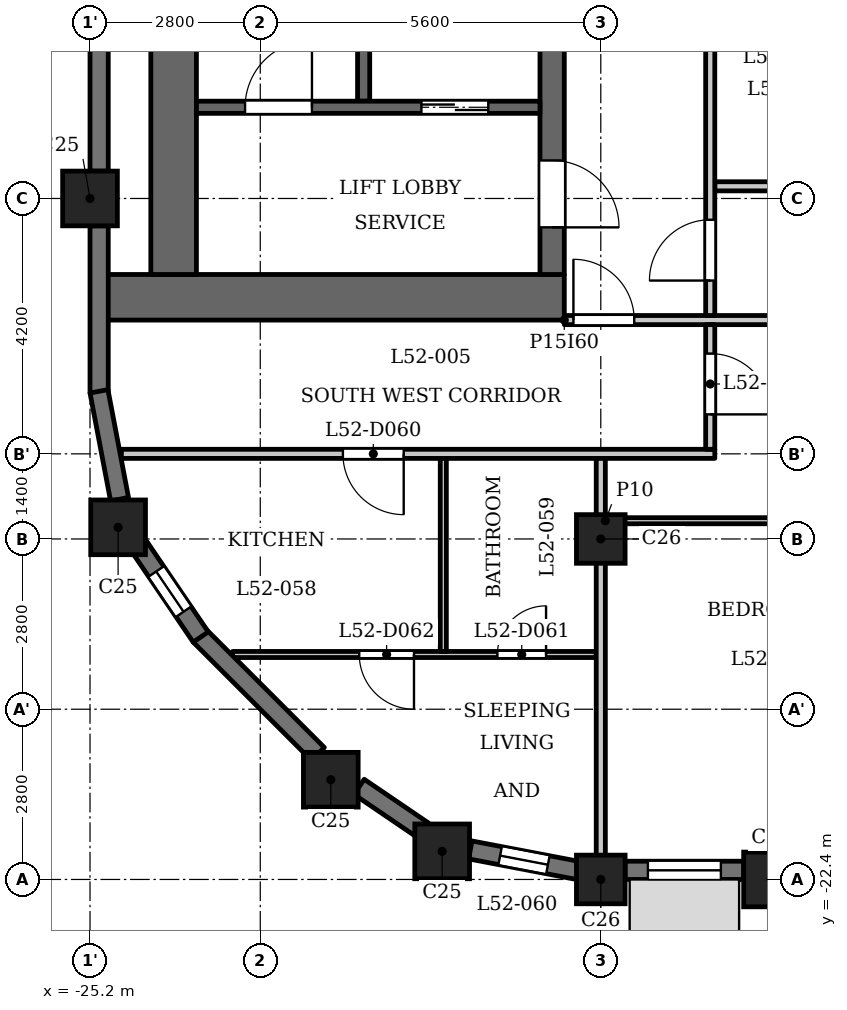
"""IFC4 building model, lengths in metres.
Left out: names, types, materials, properties, quantities, classifications, styles, units other than length and angle.
Written with IfcOpenShell. Run it as: python <this file> out.ifc"""

import sys

from ifc_helpers import new_model, si_unit, direction, frame, frame_2d, origin, origin_2d, place, context, subcontext, project, spatial, rectangle, extrude, element, fill, save


model = new_model("IFC4")
c1 = context("Model", 3, precision=1e-05, world=origin(), true_north=direction((0.0, 1.0)))
c2 = subcontext(c1, "Body", "Model", "MODEL_VIEW")
j1 = project(units=[si_unit("LENGTHUNIT", "METRE"), si_unit("PLANEANGLEUNIT", "RADIAN")], contexts=[c1])
p1 = place(None, origin())
s1 = spatial("IfcSite", under=j1, at=p1, CompositionType="ELEMENT")
p2 = place(p1, origin())
s2 = spatial("IfcBuilding", under=s1, at=p2, CompositionType="ELEMENT")
p3 = place(p2, frame((0.0, 0.0, 202.9)))
s3 = spatial("IfcBuildingStorey", under=s2, at=p3, CompositionType="ELEMENT", Elevation=202.9)
for number, where, z_axis, x_axis in (
    (1, (-19.409, -21.938, 0.0), (0.0, 0.0, 1.0), (1.0, 0.0, 0.0)),
    (2, (-14.0, -22.4, 0.0), (0.0, 0.0, 1.0), (1.0, 0.0, 0.0)),
    (3, (-25.2, -11.2, 0.0), (0.0, 0.0, 1.0), (1.0, 0.0, 0.0)),
    (4, (-24.738, -16.609, 0.0), (0.0, 0.0, 1.0), (1.0, 0.0, 0.0)),
    (5, (-21.24, -20.76, 0.0), (0.0, 0.0, 1.0), (1.0, 0.0, 0.0)),
):
    element("IfcColumn", number, at=place(p3, frame(where, z_axis=z_axis, x_axis=x_axis)), inside=s3, PredefinedType="COLUMN", context=c2, shape_type="SweptSolid", body=[
        extrude(rectangle(XDim=0.9, YDim=0.9, at=origin_2d()), origin(), (0.0, 0.0, 1.0), 3.5),
    ])
for number, where, z_axis, x_axis in (
    (6, (-16.8, -22.4, 0.0), (0.0, 0.0, 1.0), (1.0, 0.0, 0.0)),
    (7, (-16.8, -16.8, 0.0), (0.0, 0.0, 1.0), (1.0, 0.0, 0.0)),
):
    element("IfcColumn", number, at=place(p3, frame(where, z_axis=z_axis, x_axis=x_axis)), inside=s3, PredefinedType="COLUMN", context=c2, shape_type="SweptSolid", body=[
        extrude(rectangle(XDim=0.8, YDim=0.8, at=origin_2d()), origin(), (0.0, 0.0, 1.0), 3.5),
    ])
p4 = place(p3, frame((-23.397, -18.391, 0.0), z_axis=(0.0, 0.0, 1.0), x_axis=(0.707106781187, -0.707106781187, 0.0)))
e8 = element("IfcWall", 8, at=p4, inside=s3, PredefinedType="SOLIDWALL", context=c2, shape_type="SweptSolid", body=[
    extrude(rectangle(XDim=2.75, YDim=0.3, at=frame_2d((1.375, 0.0))), origin(), (0.0, 0.0, 1.0), 2.5),
])
p5 = place(p3, frame((-20.775, -20.876, 0.0), z_axis=(0.0, 0.0, 1.0), x_axis=(0.827075824828, -0.562090366388, 0.0)))
e9 = element("IfcWall", 9, at=p5, inside=s3, PredefinedType="SOLIDWALL", context=c2, shape_type="SweptSolid", body=[
    extrude(rectangle(XDim=1.277, YDim=0.3, at=frame_2d((0.638, 0.0))), origin(), (0.0, 0.0, 1.0), 2.5),
])
p6 = place(p3, frame((-18.946, -21.914, 0.0), z_axis=(0.0, 0.0, 1.0), x_axis=(0.98230529033, -0.187286722942, 0.0)))
e10 = element("IfcWall", 10, at=p6, inside=s3, PredefinedType="SOLIDWALL", context=c2, shape_type="SweptSolid", body=[
    extrude(rectangle(XDim=1.799, YDim=0.3, at=frame_2d((0.899, 0.0))), origin(), (0.0, 0.0, 1.0), 2.5),
])
p7 = place(p6, frame((0.5, 0.0, 0.6)))
e11 = element("IfcOpeningElement", 11, at=p7, cuts=e10, PredefinedType="OPENING", context=c2, shape_type="SweptSolid", body=[
    extrude(rectangle(XDim=0.8, YDim=1.55, at=frame_2d((0.4, 0.775))), frame((0.0, 0.16, 0.0), z_axis=(0.0, -1.0, 0.0), x_axis=(1.0, 0.0, 0.0)), (0.0, 0.0, 1.0), 0.32),
])
p8 = place(p3, frame((-16.4, -22.25, 0.0), z_axis=(0.0, 0.0, 1.0), x_axis=(1.0, 0.0, 0.0)))
e12 = element("IfcWall", 12, at=p8, inside=s3, PredefinedType="SOLIDWALL", context=c2, shape_type="SweptSolid", body=[
    extrude(rectangle(XDim=1.95, YDim=0.3, at=frame_2d((0.975, 0.0))), origin(), (0.0, 0.0, 1.0), 2.5),
])
p9 = place(p8, frame((0.375, 0.0, 0.6)))
e13 = element("IfcOpeningElement", 13, at=p9, cuts=e12, PredefinedType="OPENING", context=c2, shape_type="SweptSolid", body=[
    extrude(rectangle(XDim=1.2, YDim=1.55, at=frame_2d((0.6, 0.775))), frame((0.0, 0.16, 0.0), z_axis=(0.0, -1.0, 0.0), x_axis=(1.0, 0.0, 0.0)), (0.0, 0.0, 1.0), 0.32),
])
p10 = place(p3, frame((-25.05, -6.05, 0.0), z_axis=(0.0, 0.0, 1.0), x_axis=(0.0, -1.0, 0.0)))
e14 = element("IfcWall", 14, at=p10, inside=s3, PredefinedType="SOLIDWALL", context=c2, shape_type="SweptSolid", body=[
    extrude(rectangle(XDim=4.7, YDim=0.3, at=frame_2d((2.35, 0.0))), origin(), (0.0, 0.0, 1.0), 2.5),
])
p11 = place(p3, frame((-25.05, -11.65, 0.0), z_axis=(0.0, 0.0, 1.0), x_axis=(0.0, -1.0, 0.0)))
e15 = element("IfcWall", 15, at=p11, inside=s3, PredefinedType="SOLIDWALL", context=c2, shape_type="SweptSolid", body=[
    extrude(rectangle(XDim=2.75, YDim=0.3, at=frame_2d((1.375, 0.0))), origin(), (0.0, 0.0, 1.0), 2.5),
])
p12 = place(p3, frame((-25.053, -14.372, 0.0), z_axis=(0.0, 0.0, 1.0), x_axis=(0.187348135549, -0.982293579388, 0.0)))
e16 = element("IfcWall", 16, at=p12, inside=s3, PredefinedType="SOLIDWALL", context=c2, shape_type="SweptSolid", body=[
    extrude(rectangle(XDim=1.806, YDim=0.3, at=frame_2d((0.903, 0.0))), origin(), (0.0, 0.0, 1.0), 2.5),
])
p13 = place(p3, frame((-24.394, -16.919, 0.0), z_axis=(0.0, 0.0, 1.0), x_axis=(0.562040093569, -0.827109988588, 0.0)))
e17 = element("IfcWall", 17, at=p13, inside=s3, PredefinedType="SOLIDWALL", context=c2, shape_type="SweptSolid", body=[
    extrude(rectangle(XDim=1.806, YDim=0.3, at=frame_2d((0.903, 0.0))), origin(), (0.0, 0.0, 1.0), 2.5),
])
p14 = place(p13, frame((0.503, 0.0, 0.6)))
e18 = element("IfcOpeningElement", 18, at=p14, cuts=e17, PredefinedType="OPENING", context=c2, shape_type="SweptSolid", body=[
    extrude(rectangle(XDim=0.8, YDim=1.55, at=frame_2d((0.4, 0.775))), frame((0.0, 0.16, 0.0), z_axis=(0.0, -1.0, 0.0), x_axis=(1.0, 0.0, 0.0)), (0.0, 0.0, 1.0), 0.32),
])
p15 = place(p3, frame((-20.7, -9.6, 0.0), z_axis=(0.0, 0.0, 1.0), x_axis=(0.0, 1.0, 0.0)))
e19 = element("IfcWall", 19, at=p15, inside=s3, PredefinedType="SHEAR", context=c2, shape_type="SweptSolid", body=[
    extrude(rectangle(XDim=9.75, YDim=0.2, at=frame_2d((4.875, 0.0))), origin(), (0.0, 0.0, 1.0), 3.2),
])
p16 = place(p3, frame((-17.4, -12.825, 0.0), z_axis=(0.0, 0.0, 1.0), x_axis=(-1.0, 0.0, 0.0)))
e20 = element("IfcWall", 20, at=p16, inside=s3, PredefinedType="SHEAR", context=c2, shape_type="SweptSolid", body=[
    extrude(rectangle(XDim=7.6, YDim=0.75, at=frame_2d((3.8, 0.0))), origin(), (0.0, 0.0, 1.0), 3.2),
])
p17 = place(p3, frame((-17.6, -12.45, 0.0), z_axis=(0.0, 0.0, 1.0), x_axis=(0.0, 1.0, 0.0)))
e21 = element("IfcWall", 21, at=p17, inside=s3, PredefinedType="SHEAR", context=c2, shape_type="SweptSolid", body=[
    extrude(rectangle(XDim=24.9, YDim=0.4, at=frame_2d((12.45, 0.0))), origin(), (0.0, 0.0, 1.0), 3.2),
])
p18 = place(p17, frame((8.65, 0.0, 0.0)))
e22 = element("IfcOpeningElement", 22, at=p18, cuts=e21, PredefinedType="OPENING", context=c2, shape_type="SweptSolid", body=[
    extrude(rectangle(XDim=0.9, YDim=2.1, at=frame_2d((0.45, 1.05))), frame((0.0, 0.21, 0.0), z_axis=(0.0, -1.0, 0.0), x_axis=(1.0, 0.0, 0.0)), (0.0, 0.0, 1.0), 0.42),
])
p19 = place(p17, frame((15.6, 0.0, 0.0)))
e23 = element("IfcOpeningElement", 23, at=p19, cuts=e21, PredefinedType="OPENING", context=c2, shape_type="SweptSolid", body=[
    extrude(rectangle(XDim=1.1, YDim=2.1, at=frame_2d((0.55, 1.05))), frame((0.0, 0.21, 0.0), z_axis=(0.0, -1.0, 0.0), x_axis=(1.0, 0.0, 0.0)), (0.0, 0.0, 1.0), 0.42),
])
p20 = place(p17, frame((18.0, 0.0, 0.0)))
e24 = element("IfcOpeningElement", 24, at=p20, cuts=e21, PredefinedType="OPENING", context=c2, shape_type="SweptSolid", body=[
    extrude(rectangle(XDim=1.1, YDim=2.1, at=frame_2d((0.55, 1.05))), frame((0.0, 0.21, 0.0), z_axis=(0.0, -1.0, 0.0), x_axis=(1.0, 0.0, 0.0)), (0.0, 0.0, 1.0), 0.42),
])
p21 = place(p17, frame((23.025, 0.0, 0.0)))
e25 = element("IfcOpeningElement", 25, at=p21, cuts=e21, PredefinedType="OPENING", context=c2, shape_type="SweptSolid", body=[
    extrude(rectangle(XDim=1.1, YDim=2.1, at=frame_2d((0.55, 1.05))), frame((0.0, 0.21, 0.0), z_axis=(0.0, -1.0, 0.0), x_axis=(1.0, 0.0, 0.0)), (0.0, 0.0, 1.0), 0.42),
])
p22 = place(p17, frame((0.775, 0.0, 0.0)))
e26 = element("IfcOpeningElement", 26, at=p22, cuts=e21, PredefinedType="OPENING", context=c2, shape_type="SweptSolid", body=[
    extrude(rectangle(XDim=1.1, YDim=2.1, at=frame_2d((0.55, 1.05))), frame((0.0, 0.21, 0.0), z_axis=(0.0, -1.0, 0.0), x_axis=(1.0, 0.0, 0.0)), (0.0, 0.0, 1.0), 0.42),
])
p23 = place(p17, frame((12.925, 0.0, 0.0)))
e27 = element("IfcOpeningElement", 27, at=p23, cuts=e21, PredefinedType="OPENING", context=c2, shape_type="SweptSolid", body=[
    extrude(rectangle(XDim=1.8, YDim=2.1, at=frame_2d((0.9, 1.05))), frame((0.0, 0.21, 0.0), z_axis=(0.0, -1.0, 0.0), x_axis=(1.0, 0.0, 0.0)), (0.0, 0.0, 1.0), 0.42),
])
p24 = place(p3, frame((-23.825, -12.45, 0.0), z_axis=(0.0, 0.0, 1.0), x_axis=(0.0, 1.0, 0.0)))
e28 = element("IfcWall", 28, at=p24, inside=s3, PredefinedType="SHEAR", context=c2, shape_type="SweptSolid", body=[
    extrude(rectangle(XDim=24.9, YDim=0.75, at=frame_2d((12.45, 0.0))), origin(), (0.0, 0.0, 1.0), 3.2),
])
p25 = place(p3, frame((-17.8, -9.7, 0.0), z_axis=(0.0, 0.0, 1.0), x_axis=(-1.0, 0.0, 0.0)))
e29 = element("IfcWall", 29, at=p25, inside=s3, PredefinedType="SHEAR", context=c2, shape_type="SweptSolid", body=[
    extrude(rectangle(XDim=5.65, YDim=0.2, at=frame_2d((2.825, 0.0))), origin(), (0.0, 0.0, 1.0), 3.2),
])
p26 = place(p25, frame((0.85, 0.0, 0.0)))
e30 = element("IfcOpeningElement", 30, at=p26, cuts=e29, PredefinedType="OPENING", context=c2, shape_type="SweptSolid", body=[
    extrude(rectangle(XDim=1.1, YDim=2.1, at=frame_2d((0.55, 1.05))), frame((0.0, 0.11, 0.0), z_axis=(0.0, -1.0, 0.0), x_axis=(1.0, 0.0, 0.0)), (0.0, 0.0, 1.0), 0.22),
])
p27 = place(p25, frame((3.75, 0.0, 0.0)))
e31 = element("IfcOpeningElement", 31, at=p27, cuts=e29, PredefinedType="OPENING", context=c2, shape_type="SweptSolid", body=[
    extrude(rectangle(XDim=1.1, YDim=2.1, at=frame_2d((0.55, 1.05))), frame((0.0, 0.11, 0.0), z_axis=(0.0, -1.0, 0.0), x_axis=(1.0, 0.0, 0.0)), (0.0, 0.0, 1.0), 0.22),
])
p28 = place(p3, frame((-22.856, -18.7, 0.0), z_axis=(0.0, 0.0, 1.0), x_axis=(1.0, 0.0, 0.0)))
e32 = element("IfcWall", 32, at=p28, inside=s3, PredefinedType="PARTITIONING", context=c2, shape_type="SweptSolid", body=[
    extrude(rectangle(XDim=5.981, YDim=0.1, at=frame_2d((2.99, 0.0))), origin(), (0.0, 0.0, 1.0), 3.2),
])
p29 = place(p28, frame((4.356, 0.0, 0.0)))
e33 = element("IfcOpeningElement", 33, at=p29, cuts=e32, PredefinedType="OPENING", context=c2, shape_type="SweptSolid", body=[
    extrude(rectangle(XDim=0.8, YDim=2.1, at=frame_2d((0.4, 1.05))), frame((0.0, 0.06, 0.0), z_axis=(0.0, -1.0, 0.0), x_axis=(1.0, 0.0, 0.0)), (0.0, 0.0, 1.0), 0.12),
])
p30 = place(p28, frame((2.084, 0.0, 0.0)))
e34 = element("IfcOpeningElement", 34, at=p30, cuts=e32, PredefinedType="OPENING", context=c2, shape_type="SweptSolid", body=[
    extrude(rectangle(XDim=0.9, YDim=2.1, at=frame_2d((0.45, 1.05))), frame((0.0, 0.06, 0.0), z_axis=(0.0, -1.0, 0.0), x_axis=(1.0, 0.0, 0.0)), (0.0, 0.0, 1.0), 0.12),
])
p31 = place(p3, frame((-16.725, -16.5, 0.0), z_axis=(0.0, 0.0, 1.0), x_axis=(1.0, 0.0, 0.0)))
e35 = element("IfcWall", 35, at=p31, inside=s3, PredefinedType="PARTITIONING", context=c2, shape_type="SweptSolid", body=[
    extrude(rectangle(XDim=33.45, YDim=0.1, at=frame_2d((16.725, 0.0))), origin(), (0.0, 0.0, 1.0), 3.2),
])
p32 = place(p31, frame((4.075, 0.0, 0.0)))
e36 = element("IfcOpeningElement", 36, at=p32, cuts=e35, PredefinedType="OPENING", context=c2, shape_type="SweptSolid", body=[
    extrude(rectangle(XDim=0.9, YDim=2.1, at=frame_2d((0.45, 1.05))), frame((0.0, 0.06, 0.0), z_axis=(0.0, -1.0, 0.0), x_axis=(1.0, 0.0, 0.0)), (0.0, 0.0, 1.0), 0.12),
])
p33 = place(p31, frame((6.175, 0.0, 0.0)))
e37 = element("IfcOpeningElement", 37, at=p33, cuts=e35, PredefinedType="OPENING", context=c2, shape_type="SweptSolid", body=[
    extrude(rectangle(XDim=0.9, YDim=2.1, at=frame_2d((0.45, 1.05))), frame((0.0, 0.06, 0.0), z_axis=(0.0, -1.0, 0.0), x_axis=(1.0, 0.0, 0.0)), (0.0, 0.0, 1.0), 0.12),
])
p34 = place(p31, frame((30.575, 0.0, 0.0)))
e38 = element("IfcOpeningElement", 38, at=p34, cuts=e35, PredefinedType="OPENING", context=c2, shape_type="SweptSolid", body=[
    extrude(rectangle(XDim=0.9, YDim=2.1, at=frame_2d((0.45, 1.05))), frame((0.0, 0.06, 0.0), z_axis=(0.0, -1.0, 0.0), x_axis=(1.0, 0.0, 0.0)), (0.0, 0.0, 1.0), 0.12),
])
p35 = place(p31, frame((22.975, 0.0, 0.0)))
e39 = element("IfcOpeningElement", 39, at=p35, cuts=e35, PredefinedType="OPENING", context=c2, shape_type="SweptSolid", body=[
    extrude(rectangle(XDim=0.9, YDim=2.1, at=frame_2d((0.45, 1.05))), frame((0.0, 0.06, 0.0), z_axis=(0.0, -1.0, 0.0), x_axis=(1.0, 0.0, 0.0)), (0.0, 0.0, 1.0), 0.12),
])
p36 = place(p3, frame((-24.684, -15.4, 0.0), z_axis=(0.0, 0.0, 1.0), x_axis=(1.0, 0.0, 0.0)))
e40 = element("IfcWall", 40, at=p36, inside=s3, PredefinedType="PARTITIONING", context=c2, shape_type="SweptSolid", body=[
    extrude(rectangle(XDim=9.759, YDim=0.15, at=frame_2d((4.879, 0.0))), origin(), (0.0, 0.0, 1.0), 3.2),
])
p37 = place(p36, frame((3.643, 0.0, 0.0)))
e41 = element("IfcOpeningElement", 41, at=p37, cuts=e40, PredefinedType="OPENING", context=c2, shape_type="SweptSolid", body=[
    extrude(rectangle(XDim=1.0, YDim=2.1, at=frame_2d((0.5, 1.05))), frame((0.0, 0.085, 0.0), z_axis=(0.0, -1.0, 0.0), x_axis=(1.0, 0.0, 0.0)), (0.0, 0.0, 1.0), 0.17),
])
p38 = place(p3, frame((-17.4, -13.2, 0.0), z_axis=(0.0, 0.0, 1.0), x_axis=(1.0, 0.0, 0.0)))
e42 = element("IfcWall", 42, at=p38, inside=s3, PredefinedType="PARTITIONING", context=c2, shape_type="SweptSolid", body=[
    extrude(rectangle(XDim=34.8, YDim=0.15, at=frame_2d((17.4, 0.0))), origin(), (0.0, 0.0, 1.0), 3.2),
])
p39 = place(p38, frame((0.15, 0.0, 0.0)))
e43 = element("IfcOpeningElement", 43, at=p39, cuts=e42, PredefinedType="OPENING", context=c2, shape_type="SweptSolid", body=[
    extrude(rectangle(XDim=1.0, YDim=2.1, at=frame_2d((0.5, 1.05))), frame((0.0, 0.085, 0.0), z_axis=(0.0, -1.0, 0.0), x_axis=(1.0, 0.0, 0.0)), (0.0, 0.0, 1.0), 0.17),
])
p40 = place(p38, frame((33.55, 0.0, 0.0)))
e44 = element("IfcOpeningElement", 44, at=p40, cuts=e42, PredefinedType="OPENING", context=c2, shape_type="SweptSolid", body=[
    extrude(rectangle(XDim=1.0, YDim=2.1, at=frame_2d((0.5, 1.05))), frame((0.0, 0.085, 0.0), z_axis=(0.0, -1.0, 0.0), x_axis=(1.0, 0.0, 0.0)), (0.0, 0.0, 1.0), 0.17),
])
p41 = place(p3, frame((-14.925, -11.0, 0.0), z_axis=(0.0, 0.0, 1.0), x_axis=(1.0, 0.0, 0.0)))
e45 = element("IfcWall", 45, at=p41, inside=s3, PredefinedType="PARTITIONING", context=c2, shape_type="SweptSolid", body=[
    extrude(rectangle(XDim=29.85, YDim=0.15, at=frame_2d((14.925, 0.0))), origin(), (0.0, 0.0, 1.0), 3.2),
])
p42 = place(p41, frame((2.575, 0.0, 0.0)))
e46 = element("IfcOpeningElement", 46, at=p42, cuts=e45, PredefinedType="OPENING", context=c2, shape_type="SweptSolid", body=[
    extrude(rectangle(XDim=1.0, YDim=2.1, at=frame_2d((0.5, 1.05))), frame((0.0, 0.085, 0.0), z_axis=(0.0, -1.0, 0.0), x_axis=(1.0, 0.0, 0.0)), (0.0, 0.0, 1.0), 0.17),
])
p43 = place(p41, frame((26.375, 0.0, 0.0)))
e47 = element("IfcOpeningElement", 47, at=p43, cuts=e45, PredefinedType="OPENING", context=c2, shape_type="SweptSolid", body=[
    extrude(rectangle(XDim=1.0, YDim=2.1, at=frame_2d((0.5, 1.05))), frame((0.0, 0.085, 0.0), z_axis=(0.0, -1.0, 0.0), x_axis=(1.0, 0.0, 0.0)), (0.0, 0.0, 1.0), 0.17),
])
p44 = place(p3, frame((-19.39, -18.65, 0.0), z_axis=(0.0, 0.0, 1.0), x_axis=(0.0, 1.0, 0.0)))
e48 = element("IfcWall", 48, at=p44, inside=s3, PredefinedType="PARTITIONING", context=c2, shape_type="SweptSolid", body=[
    extrude(rectangle(XDim=3.175, YDim=0.1, at=frame_2d((1.587, 0.0))), origin(), (0.0, 0.0, 1.0), 3.2),
])
p45 = place(p3, frame((-16.8, -22.31, 0.0), z_axis=(0.0, 0.0, 1.0), x_axis=(0.0, 1.0, 0.0)))
e49 = element("IfcWall", 49, at=p45, inside=s3, PredefinedType="PARTITIONING", context=c2, shape_type="SweptSolid", body=[
    extrude(rectangle(XDim=6.835, YDim=0.15, at=frame_2d((3.417, 0.0))), origin(), (0.0, 0.0, 1.0), 2.55),
])
p46 = place(p3, frame((-15.0, -15.325, 0.0), z_axis=(0.0, 0.0, 1.0), x_axis=(0.0, 1.0, 0.0)))
e50 = element("IfcWall", 50, at=p46, inside=s3, PredefinedType="PARTITIONING", context=c2, shape_type="SweptSolid", body=[
    extrude(rectangle(XDim=2.05, YDim=0.15, at=frame_2d((1.025, 0.0))), origin(), (0.0, 0.0, 1.0), 3.2),
])
p47 = place(p46, frame((0.574, 0.0, 0.0)))
e51 = element("IfcOpeningElement", 51, at=p47, cuts=e50, PredefinedType="OPENING", context=c2, shape_type="SweptSolid", body=[
    extrude(rectangle(XDim=1.0, YDim=2.1, at=frame_2d((0.5, 1.05))), frame((0.0, 0.085, 0.0), z_axis=(0.0, -1.0, 0.0), x_axis=(1.0, 0.0, 0.0)), (0.0, 0.0, 1.0), 0.17),
])
p48 = place(p3, frame((-15.0, -13.125, 0.0), z_axis=(0.0, 0.0, 1.0), x_axis=(0.0, 1.0, 0.0)))
e52 = element("IfcWall", 52, at=p48, inside=s3, PredefinedType="PARTITIONING", context=c2, shape_type="SweptSolid", body=[
    extrude(rectangle(XDim=6.356, YDim=0.15, at=frame_2d((3.178, 0.0))), origin(), (0.0, 0.0, 1.0), 3.2),
])
p49 = place(p48, frame((0.575, 0.0, 0.0)))
e53 = element("IfcOpeningElement", 53, at=p49, cuts=e52, PredefinedType="OPENING", context=c2, shape_type="SweptSolid", body=[
    extrude(rectangle(XDim=1.0, YDim=2.1, at=frame_2d((0.5, 1.05))), frame((0.0, 0.085, 0.0), z_axis=(0.0, -1.0, 0.0), x_axis=(1.0, 0.0, 0.0)), (0.0, 0.0, 1.0), 0.17),
])
p50 = place(p26, origin())
e54 = element("IfcDoor", 54, at=p50, inside=s3, OperationType="DOUBLE_DOOR_SLIDING", PredefinedType="DOOR", context=c2, shape_type="SweptSolid", body=[
    extrude(rectangle(XDim=1.1, YDim=2.1, at=frame_2d((0.55, 1.05))), frame((0.0, 0.025, 0.0), z_axis=(0.0, -1.0, 0.0), x_axis=(1.0, 0.0, 0.0)), (0.0, 0.0, 1.0), 0.05),
])
fill(e30, e54)
p51 = place(p22, origin())
e55 = element("IfcDoor", 55, at=p51, inside=s3, OperationType="SINGLE_SWING_LEFT", PredefinedType="DOOR", context=c2, shape_type="SweptSolid", body=[
    extrude(rectangle(XDim=1.1, YDim=2.1, at=frame_2d((0.55, 1.05))), frame((0.0, 0.025, 0.0), z_axis=(0.0, -1.0, 0.0), x_axis=(1.0, 0.0, 0.0)), (0.0, 0.0, 1.0), 0.05),
])
fill(e26, e55)
p52 = place(p27, origin())
e56 = element("IfcDoor", 56, at=p52, inside=s3, OperationType="SINGLE_SWING_LEFT", PredefinedType="DOOR", context=c2, shape_type="SweptSolid", body=[
    extrude(rectangle(XDim=1.1, YDim=2.1, at=frame_2d((0.55, 1.05))), frame((0.0, 0.025, 0.0), z_axis=(0.0, -1.0, 0.0), x_axis=(1.0, 0.0, 0.0)), (0.0, 0.0, 1.0), 0.05),
])
fill(e31, e56)
p53 = place(p49, origin())
e57 = element("IfcDoor", 57, at=p53, inside=s3, OperationType="SINGLE_SWING_RIGHT", PredefinedType="DOOR", context=c2, shape_type="SweptSolid", body=[
    extrude(rectangle(XDim=1.0, YDim=2.1, at=frame_2d((0.5, 1.05))), frame((0.0, 0.025, 0.0), z_axis=(0.0, -1.0, 0.0), x_axis=(1.0, 0.0, 0.0)), (0.0, 0.0, 1.0), 0.05),
])
fill(e53, e57)
p54 = place(p39, origin())
e58 = element("IfcDoor", 58, at=p54, inside=s3, OperationType="SINGLE_SWING_RIGHT", PredefinedType="DOOR", context=c2, shape_type="SweptSolid", body=[
    extrude(rectangle(XDim=1.0, YDim=2.1, at=frame_2d((0.5, 1.05))), frame((0.0, 0.025, 0.0), z_axis=(0.0, -1.0, 0.0), x_axis=(1.0, 0.0, 0.0)), (0.0, 0.0, 1.0), 0.05),
])
fill(e43, e58)
p55 = place(p47, origin())
e59 = element("IfcDoor", 59, at=p55, inside=s3, OperationType="SINGLE_SWING_LEFT", PredefinedType="DOOR", context=c2, shape_type="SweptSolid", body=[
    extrude(rectangle(XDim=1.0, YDim=2.1, at=frame_2d((0.5, 1.05))), frame((0.0, 0.025, 0.0), z_axis=(0.0, -1.0, 0.0), x_axis=(1.0, 0.0, 0.0)), (0.0, 0.0, 1.0), 0.05),
])
fill(e51, e59)
p56 = place(p37, origin())
e60 = element("IfcDoor", 60, at=p56, inside=s3, OperationType="SINGLE_SWING_RIGHT", PredefinedType="DOOR", context=c2, shape_type="SweptSolid", body=[
    extrude(rectangle(XDim=1.0, YDim=2.1, at=frame_2d((0.5, 1.05))), frame((0.0, 0.025, 0.0), z_axis=(0.0, -1.0, 0.0), x_axis=(1.0, 0.0, 0.0)), (0.0, 0.0, 1.0), 0.05),
])
fill(e41, e60)
p57 = place(p29, origin())
e61 = element("IfcDoor", 61, at=p57, inside=s3, OperationType="SINGLE_SWING_LEFT", PredefinedType="DOOR", context=c2, shape_type="SweptSolid", body=[
    extrude(rectangle(XDim=0.8, YDim=2.1, at=frame_2d((0.4, 1.05))), frame((0.0, 0.025, 0.0), z_axis=(0.0, -1.0, 0.0), x_axis=(1.0, 0.0, 0.0)), (0.0, 0.0, 1.0), 0.05),
])
fill(e33, e61)
p58 = place(p30, origin())
e62 = element("IfcDoor", 62, at=p58, inside=s3, OperationType="SINGLE_SWING_RIGHT", PredefinedType="DOOR", context=c2, shape_type="SweptSolid", body=[
    extrude(rectangle(XDim=0.9, YDim=2.1, at=frame_2d((0.45, 1.05))), frame((0.0, 0.025, 0.0), z_axis=(0.0, -1.0, 0.0), x_axis=(1.0, 0.0, 0.0)), (0.0, 0.0, 1.0), 0.05),
])
fill(e34, e62)
p59 = place(p7, origin())
e63 = element("IfcWindow", 63, at=p59, inside=s3, PartitioningType="SINGLE_PANEL", PredefinedType="WINDOW", context=c2, shape_type="SweptSolid", body=[
    extrude(rectangle(XDim=0.8, YDim=1.55, at=frame_2d((0.4, 0.775))), frame((0.0, 0.03, 0.0), z_axis=(0.0, -1.0, 0.0), x_axis=(1.0, 0.0, 0.0)), (0.0, 0.0, 1.0), 0.06),
])
fill(e11, e63)
p60 = place(p9, origin())
e64 = element("IfcWindow", 64, at=p60, inside=s3, PartitioningType="SINGLE_PANEL", PredefinedType="WINDOW", context=c2, shape_type="SweptSolid", body=[
    extrude(rectangle(XDim=1.2, YDim=1.55, at=frame_2d((0.6, 0.775))), frame((0.0, 0.03, 0.0), z_axis=(0.0, -1.0, 0.0), x_axis=(1.0, 0.0, 0.0)), (0.0, 0.0, 1.0), 0.06),
])
fill(e13, e64)
p61 = place(p14, origin())
e65 = element("IfcWindow", 65, at=p61, inside=s3, PartitioningType="SINGLE_PANEL", PredefinedType="WINDOW", context=c2, shape_type="SweptSolid", body=[
    extrude(rectangle(XDim=0.8, YDim=1.55, at=frame_2d((0.4, 0.775))), frame((0.0, 0.03, 0.0), z_axis=(0.0, -1.0, 0.0), x_axis=(1.0, 0.0, 0.0)), (0.0, 0.0, 1.0), 0.06),
])
fill(e18, e65)
save(model, sys.argv[1])
